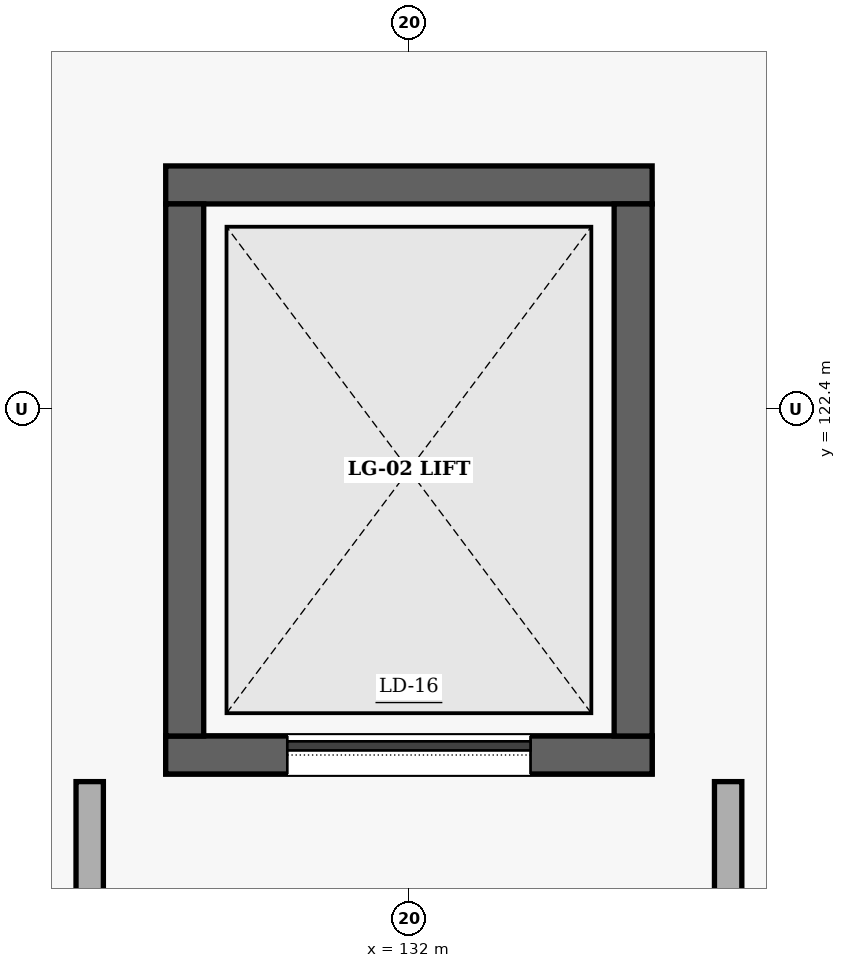
"""IFC4 building model, lengths in metres.
Left out: names, types, materials, properties, quantities, classifications, styles, units other than length and angle.
Written with IfcOpenShell. Run it as: python <this file> out.ifc"""

import sys

from ifc_helpers import new_model, si_unit, direction, frame, frame_2d, origin, place, context, subcontext, project, spatial, rectangle, extrude, element, fill, save


model = new_model("IFC4")
c1 = context("Model", 3, precision=1e-05, world=origin(), true_north=direction((0.0, 1.0)))
c2 = subcontext(c1, "Body", "Model", "MODEL_VIEW")
j1 = project(units=[si_unit("LENGTHUNIT", "METRE"), si_unit("PLANEANGLEUNIT", "RADIAN")], contexts=[c1])
p1 = place(None, origin())
s1 = spatial("IfcSite", under=j1, at=p1, CompositionType="ELEMENT")
p2 = place(p1, origin())
s2 = spatial("IfcBuilding", under=s1, at=p2, CompositionType="ELEMENT")
p3 = place(p2, origin())
s3 = spatial("IfcBuildingStorey", under=s2, at=p3, CompositionType="ELEMENT", Elevation=0.0)
p4 = place(p3, frame((130.4, 120.125, -1.65), z_axis=(0.0, 0.0, 1.0), x_axis=(1.0, 0.0, 0.0)))
e1 = element("IfcWall", 1, at=p4, inside=s3, PredefinedType="SHEAR", context=c2, shape_type="SweptSolid", body=[
    extrude(rectangle(XDim=3.2, YDim=0.25, at=frame_2d((1.6, 0.0))), origin(), (0.0, 0.0, 1.0), 1.31),
])
p5 = place(p3, frame((130.4, 120.125, 0.0), z_axis=(0.0, 0.0, 1.0), x_axis=(1.0, 0.0, 0.0)))
e2 = element("IfcWall", 2, at=p5, inside=s3, PredefinedType="SHEAR", context=c2, shape_type="SweptSolid", body=[
    extrude(rectangle(XDim=3.2, YDim=0.25, at=frame_2d((1.6, 0.0))), origin(), (0.0, 0.0, 1.0), 5.12),
])
p6 = place(p5, frame((0.8, 0.0, 0.0)))
e3 = element("IfcOpeningElement", 3, at=p6, cuts=e2, PredefinedType="OPENING", context=c2, shape_type="SweptSolid", body=[
    extrude(rectangle(XDim=1.6, YDim=2.2, at=frame_2d((0.8, 1.1))), frame((0.0, 0.135, 0.0), z_axis=(0.0, -1.0, 0.0), x_axis=(1.0, 0.0, 0.0)), (0.0, 0.0, 1.0), 0.27),
])
p7 = place(p3, frame((130.4, 123.875, -1.65), z_axis=(0.0, 0.0, 1.0), x_axis=(1.0, 0.0, 0.0)))
e4 = element("IfcWall", 4, at=p7, inside=s3, PredefinedType="SHEAR", context=c2, shape_type="SweptSolid", body=[
    extrude(rectangle(XDim=3.2, YDim=0.25, at=frame_2d((1.6, 0.0))), origin(), (0.0, 0.0, 1.0), 6.77),
])
for number, where, z_axis, x_axis in (
    (5, (130.525, 120.25, -1.65), (0.0, 0.0, 1.0), (0.0, 1.0, 0.0)),
    (6, (133.475, 120.25, -1.65), (0.0, 0.0, 1.0), (0.0, 1.0, 0.0)),
):
    element("IfcWall", number, at=place(p3, frame(where, z_axis=z_axis, x_axis=x_axis)), inside=s3, PredefinedType="SHEAR", context=c2, shape_type="SweptSolid", body=[
        extrude(rectangle(XDim=3.5, YDim=0.25, at=frame_2d((1.75, 0.0))), origin(), (0.0, 0.0, 1.0), 6.77),
    ])
for number, where, z_axis, x_axis in (
    (7, (129.9, 116.9, 0.0), (0.0, 0.0, 1.0), (0.0, 1.0, 0.0)),
    (8, (134.1, 116.9, 0.0), (0.0, 0.0, 1.0), (0.0, 1.0, 0.0)),
):
    element("IfcWall", number, at=place(p3, frame(where, z_axis=z_axis, x_axis=x_axis)), inside=s3, PredefinedType="PARTITIONING", context=c2, shape_type="SweptSolid", body=[
        extrude(rectangle(XDim=3.05, YDim=0.18, at=frame_2d((1.525, 0.0))), origin(), (0.0, 0.0, 1.0), 5.12),
    ])
p8 = place(p6, origin())
e9 = element("IfcDoor", 9, at=p8, inside=s3, OperationType="SLIDING_TO_LEFT", PredefinedType="DOOR", context=c2, shape_type="SweptSolid", body=[
    extrude(rectangle(XDim=1.6, YDim=2.2, at=frame_2d((0.8, 1.1))), frame((0.0, 0.025, 0.0), z_axis=(0.0, -1.0, 0.0), x_axis=(1.0, 0.0, 0.0)), (0.0, 0.0, 1.0), 0.05),
])
fill(e3, e9)
save(model, sys.argv[1])
